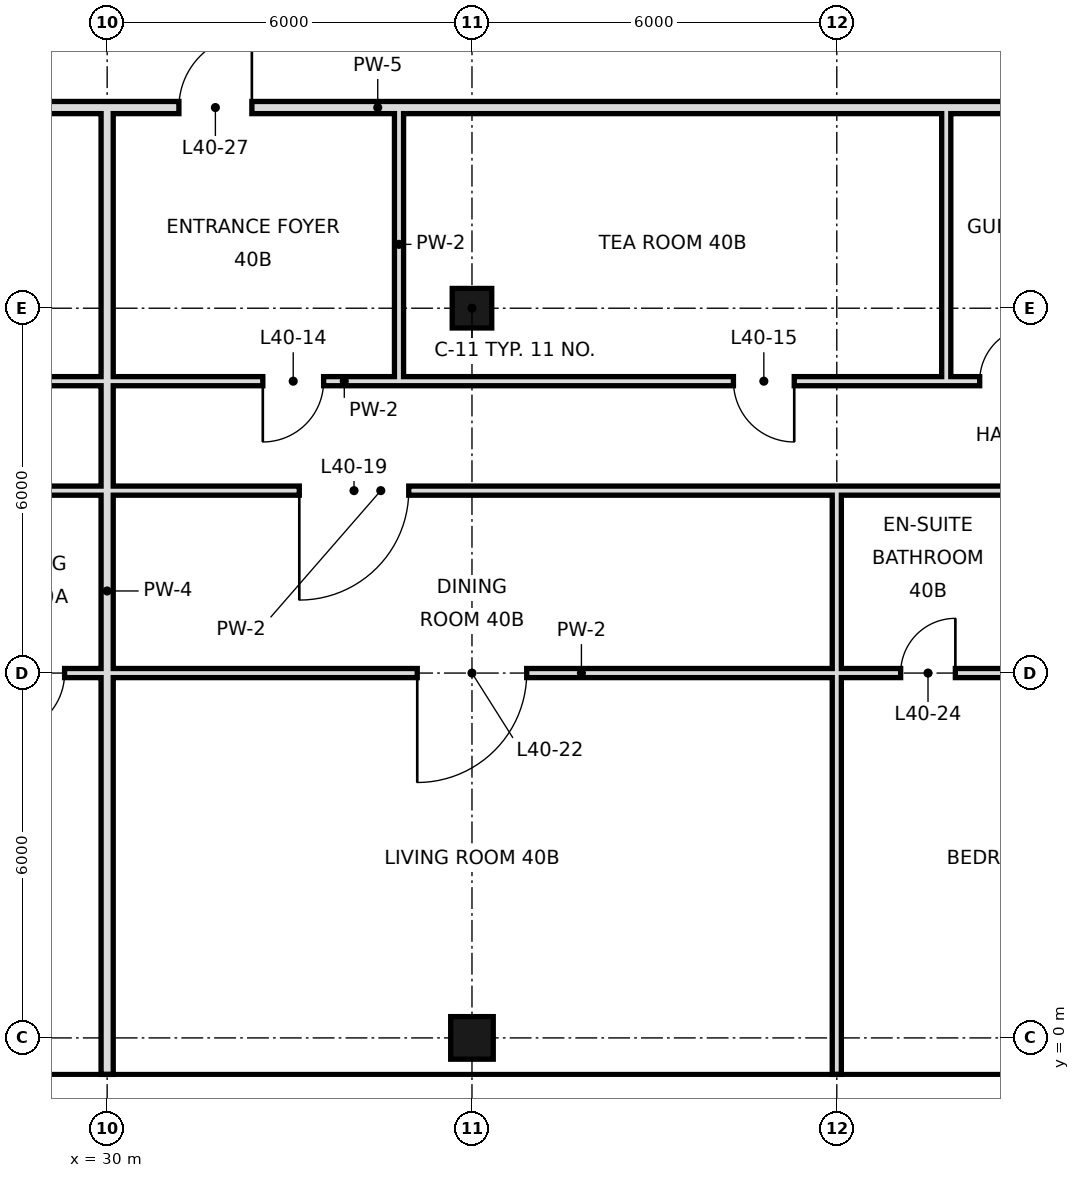
"""IFC4 building model, lengths in metres.
Left out: names, types, materials, properties, quantities, classifications, styles, units other than length and angle.
Written with IfcOpenShell. Run it as: python <this file> out.ifc"""

import sys

from ifc_helpers import new_model, si_unit, direction, frame, frame_2d, origin, origin_2d, place, context, subcontext, project, spatial, rectangle, hollow_rectangle, extrude, element, fill, save


model = new_model("IFC4")
c1 = context("Model", 3, precision=1e-05, world=origin(), true_north=direction((0.0, 1.0)))
c2 = subcontext(c1, "Body", "Model", "MODEL_VIEW")
j1 = project(units=[si_unit("LENGTHUNIT", "METRE"), si_unit("PLANEANGLEUNIT", "RADIAN")], contexts=[c1])
p1 = place(None, origin())
s1 = spatial("IfcSite", under=j1, at=p1, CompositionType="ELEMENT")
p2 = place(p1, origin())
s2 = spatial("IfcBuilding", under=s1, at=p2, CompositionType="ELEMENT")
p3 = place(p2, frame((0.0, 0.0, 174.4)))
s3 = spatial("IfcBuildingStorey", under=s2, at=p3, CompositionType="ELEMENT", Elevation=174.4)
p4 = place(p3, frame((36.0, 0.0, 0.0), z_axis=(0.0, 0.0, 1.0), x_axis=(1.0, 0.0, 0.0)))
e1 = element("IfcColumn", 1, at=p4, inside=s3, PredefinedType="COLUMN", context=c2, shape_type="SweptSolid", body=[
    extrude(hollow_rectangle(XDim=0.7, YDim=0.7, WallThickness=0.036, at=origin_2d()), origin(), (0.0, 0.0, 1.0), 3.6),
])
p5 = place(p3, frame((36.0, 12.0, 0.0), z_axis=(0.0, 0.0, 1.0), x_axis=(1.0, 0.0, 0.0)))
e2 = element("IfcColumn", 2, at=p5, inside=s3, PredefinedType="COLUMN", context=c2, shape_type="SweptSolid", body=[
    extrude(hollow_rectangle(XDim=0.65, YDim=0.65, WallThickness=0.032, at=origin_2d()), origin(), (0.0, 0.0, 1.0), 3.6),
])
p6 = place(p3, frame((30.0, -0.6, 0.0), z_axis=(0.0, 0.0, 1.0), x_axis=(0.0, 1.0, 0.0)))
e3 = element("IfcWall", 3, at=p6, inside=s3, PredefinedType="SOLIDWALL", context=c2, shape_type="SweptSolid", body=[
    extrude(rectangle(XDim=15.9, YDim=0.2, at=frame_2d((7.95, 0.0))), origin(), (0.0, 0.0, 1.0), 2.72),
])
p7 = place(p3, frame((34.8, 10.8, 0.0), z_axis=(0.0, 0.0, 1.0), x_axis=(0.0, 1.0, 0.0)))
e4 = element("IfcWall", 4, at=p7, inside=s3, PredefinedType="PARTITIONING", context=c2, shape_type="SweptSolid", body=[
    extrude(rectangle(XDim=4.5, YDim=0.15, at=frame_2d((2.25, 0.0))), origin(), (0.0, 0.0, 1.0), 3.42),
])
p8 = place(p3, frame((42.0, -0.6, 0.0), z_axis=(0.0, 0.0, 1.0), x_axis=(0.0, 1.0, 0.0)))
e5 = element("IfcWall", 5, at=p8, inside=s3, PredefinedType="PARTITIONING", context=c2, shape_type="SweptSolid", body=[
    extrude(rectangle(XDim=6.6, YDim=0.15, at=frame_2d((3.3, 0.0))), origin(), (0.0, 0.0, 1.0), 2.72),
])
p9 = place(p3, frame((42.0, 6.0, 0.0), z_axis=(0.0, 0.0, 1.0), x_axis=(0.0, 1.0, 0.0)))
e6 = element("IfcWall", 6, at=p9, inside=s3, PredefinedType="PARTITIONING", context=c2, shape_type="SweptSolid", body=[
    extrude(rectangle(XDim=3.0, YDim=0.15, at=frame_2d((1.5, 0.0))), origin(), (0.0, 0.0, 1.0), 2.72),
])
p10 = place(p3, frame((43.8, 10.8, 0.0), z_axis=(0.0, 0.0, 1.0), x_axis=(0.0, 1.0, 0.0)))
e7 = element("IfcWall", 7, at=p10, inside=s3, PredefinedType="PARTITIONING", context=c2, shape_type="SweptSolid", body=[
    extrude(rectangle(XDim=4.5, YDim=0.15, at=frame_2d((2.25, 0.0))), origin(), (0.0, 0.0, 1.0), 3.42),
])
p11 = place(p3, frame((24.0, 10.8, 0.0), z_axis=(0.0, 0.0, 1.0), x_axis=(1.0, 0.0, 0.0)))
e8 = element("IfcWall", 8, at=p11, inside=s3, PredefinedType="PARTITIONING", context=c2, shape_type="SweptSolid", body=[
    extrude(rectangle(XDim=19.8, YDim=0.15, at=frame_2d((9.9, 0.0))), origin(), (0.0, 0.0, 1.0), 3.42),
])
p12 = place(p11, frame((2.5, 0.0, 0.0)))
e9 = element("IfcOpeningElement", 9, at=p12, cuts=e8, PredefinedType="OPENING", context=c2, shape_type="SweptSolid", body=[
    extrude(rectangle(XDim=1.0, YDim=2.4, at=frame_2d((0.5, 1.2))), frame((0.0, 0.085, 0.0), z_axis=(0.0, -1.0, 0.0), x_axis=(1.0, 0.0, 0.0)), (0.0, 0.0, 1.0), 0.17),
])
p13 = place(p11, frame((8.56, 0.0, 0.0)))
e10 = element("IfcOpeningElement", 10, at=p13, cuts=e8, PredefinedType="OPENING", context=c2, shape_type="SweptSolid", body=[
    extrude(rectangle(XDim=1.0, YDim=2.4, at=frame_2d((0.5, 1.2))), frame((0.0, 0.085, 0.0), z_axis=(0.0, -1.0, 0.0), x_axis=(1.0, 0.0, 0.0)), (0.0, 0.0, 1.0), 0.17),
])
p14 = place(p11, frame((16.3, 0.0, 0.0)))
e11 = element("IfcOpeningElement", 11, at=p14, cuts=e8, PredefinedType="OPENING", context=c2, shape_type="SweptSolid", body=[
    extrude(rectangle(XDim=1.0, YDim=2.4, at=frame_2d((0.5, 1.2))), frame((0.0, 0.085, 0.0), z_axis=(0.0, -1.0, 0.0), x_axis=(1.0, 0.0, 0.0)), (0.0, 0.0, 1.0), 0.17),
])
p15 = place(p3, frame((43.8, 10.8, 0.0), z_axis=(0.0, 0.0, 1.0), x_axis=(1.0, 0.0, 0.0)))
e12 = element("IfcWall", 12, at=p15, inside=s3, PredefinedType="PARTITIONING", context=c2, shape_type="SweptSolid", body=[
    extrude(rectangle(XDim=2.4, YDim=0.15, at=frame_2d((1.2, 0.0))), origin(), (0.0, 0.0, 1.0), 3.42),
])
p16 = place(p15, frame((0.55, 0.0, 0.0)))
e13 = element("IfcOpeningElement", 13, at=p16, cuts=e12, PredefinedType="OPENING", context=c2, shape_type="SweptSolid", body=[
    extrude(rectangle(XDim=0.9, YDim=2.4, at=frame_2d((0.45, 1.2))), frame((0.0, 0.085, 0.0), z_axis=(0.0, -1.0, 0.0), x_axis=(1.0, 0.0, 0.0)), (0.0, 0.0, 1.0), 0.17),
])
p17 = place(p3, frame((24.0, 15.3, 0.0), z_axis=(0.0, 0.0, 1.0), x_axis=(1.0, 0.0, 0.0)))
e14 = element("IfcWall", 14, at=p17, inside=s3, PredefinedType="SOLIDWALL", context=c2, shape_type="SweptSolid", body=[
    extrude(rectangle(XDim=20.9, YDim=0.2, at=frame_2d((10.45, 0.0))), origin(), (0.0, 0.0, 1.0), 2.72),
])
p18 = place(p17, frame((3.26, 0.0, 0.0)))
e15 = element("IfcOpeningElement", 15, at=p18, cuts=e14, PredefinedType="OPENING", context=c2, shape_type="SweptSolid", body=[
    extrude(rectangle(XDim=1.2, YDim=2.4, at=frame_2d((0.6, 1.2))), frame((0.0, 0.11, 0.0), z_axis=(0.0, -1.0, 0.0), x_axis=(1.0, 0.0, 0.0)), (0.0, 0.0, 1.0), 0.22),
])
p19 = place(p17, frame((7.18, 0.0, 0.0)))
e16 = element("IfcOpeningElement", 16, at=p19, cuts=e14, PredefinedType="OPENING", context=c2, shape_type="SweptSolid", body=[
    extrude(rectangle(XDim=1.2, YDim=2.4, at=frame_2d((0.6, 1.2))), frame((0.0, 0.11, 0.0), z_axis=(0.0, -1.0, 0.0), x_axis=(1.0, 0.0, 0.0)), (0.0, 0.0, 1.0), 0.22),
])
p20 = place(p3, frame((27.0, 6.0, 0.0), z_axis=(0.0, 0.0, 1.0), x_axis=(1.0, 0.0, 0.0)))
e17 = element("IfcWall", 17, at=p20, inside=s3, PredefinedType="PARTITIONING", context=c2, shape_type="SweptSolid", body=[
    extrude(rectangle(XDim=15.0, YDim=0.15, at=frame_2d((7.5, 0.0))), origin(), (0.0, 0.0, 1.0), 2.97),
])
p21 = place(p20, frame((1.3, 0.0, 0.0)))
e18 = element("IfcOpeningElement", 18, at=p21, cuts=e17, PredefinedType="OPENING", context=c2, shape_type="SweptSolid", body=[
    extrude(rectangle(XDim=1.0, YDim=2.4, at=frame_2d((0.5, 1.2))), frame((0.0, 0.085, 0.0), z_axis=(0.0, -1.0, 0.0), x_axis=(1.0, 0.0, 0.0)), (0.0, 0.0, 1.0), 0.17),
])
p22 = place(p20, frame((8.1, 0.0, 0.0)))
e19 = element("IfcOpeningElement", 19, at=p22, cuts=e17, PredefinedType="OPENING", context=c2, shape_type="SweptSolid", body=[
    extrude(rectangle(XDim=1.8, YDim=2.4, at=frame_2d((0.9, 1.2))), frame((0.0, 0.085, 0.0), z_axis=(0.0, -1.0, 0.0), x_axis=(1.0, 0.0, 0.0)), (0.0, 0.0, 1.0), 0.17),
])
p23 = place(p3, frame((42.0, 6.0, 0.0), z_axis=(0.0, 0.0, 1.0), x_axis=(1.0, 0.0, 0.0)))
e20 = element("IfcWall", 20, at=p23, inside=s3, PredefinedType="PARTITIONING", context=c2, shape_type="SweptSolid", body=[
    extrude(rectangle(XDim=3.0, YDim=0.15, at=frame_2d((1.5, 0.0))), origin(), (0.0, 0.0, 1.0), 2.97),
])
p24 = place(p23, frame((1.05, 0.0, 0.0)))
e21 = element("IfcOpeningElement", 21, at=p24, cuts=e20, PredefinedType="OPENING", context=c2, shape_type="SweptSolid", body=[
    extrude(rectangle(XDim=0.9, YDim=2.4, at=frame_2d((0.45, 1.2))), frame((0.0, 0.085, 0.0), z_axis=(0.0, -1.0, 0.0), x_axis=(1.0, 0.0, 0.0)), (0.0, 0.0, 1.0), 0.17),
])
p25 = place(p3, frame((27.0, 9.0, 0.0), z_axis=(0.0, 0.0, 1.0), x_axis=(1.0, 0.0, 0.0)))
e22 = element("IfcWall", 22, at=p25, inside=s3, PredefinedType="PARTITIONING", context=c2, shape_type="SweptSolid", body=[
    extrude(rectangle(XDim=15.0, YDim=0.15, at=frame_2d((7.5, 0.0))), origin(), (0.0, 0.0, 1.0), 3.42),
])
p26 = place(p25, frame((1.0, 0.0, 0.0)))
e23 = element("IfcOpeningElement", 23, at=p26, cuts=e22, PredefinedType="OPENING", context=c2, shape_type="SweptSolid", body=[
    extrude(rectangle(XDim=1.0, YDim=2.4, at=frame_2d((0.5, 1.2))), frame((0.0, 0.085, 0.0), z_axis=(0.0, -1.0, 0.0), x_axis=(1.0, 0.0, 0.0)), (0.0, 0.0, 1.0), 0.17),
])
p27 = place(p25, frame((6.16, 0.0, 0.0)))
e24 = element("IfcOpeningElement", 24, at=p27, cuts=e22, PredefinedType="OPENING", context=c2, shape_type="SweptSolid", body=[
    extrude(rectangle(XDim=1.8, YDim=2.4, at=frame_2d((0.9, 1.2))), frame((0.0, 0.085, 0.0), z_axis=(0.0, -1.0, 0.0), x_axis=(1.0, 0.0, 0.0)), (0.0, 0.0, 1.0), 0.17),
])
p28 = place(p3, frame((42.0, 9.0, 0.0), z_axis=(0.0, 0.0, 1.0), x_axis=(1.0, 0.0, 0.0)))
e25 = element("IfcWall", 25, at=p28, inside=s3, PredefinedType="PARTITIONING", context=c2, shape_type="SweptSolid", body=[
    extrude(rectangle(XDim=3.0, YDim=0.15, at=frame_2d((1.5, 0.0))), origin(), (0.0, 0.0, 1.0), 3.42),
])
p29 = place(p21, frame((1.0, 0.0, 0.0), z_axis=(0.0, 0.0, 1.0), x_axis=(-1.0, 0.0, 0.0)))
e26 = element("IfcDoor", 26, at=p29, inside=s3, OperationType="SINGLE_SWING_RIGHT", PredefinedType="DOOR", context=c2, shape_type="SweptSolid", body=[
    extrude(rectangle(XDim=1.0, YDim=2.4, at=frame_2d((0.5, 1.2))), frame((0.0, 0.025, 0.0), z_axis=(0.0, -1.0, 0.0), x_axis=(1.0, 0.0, 0.0)), (0.0, 0.0, 1.0), 0.05),
])
fill(e18, e26)
p30 = place(p13, frame((1.0, 0.0, 0.0), z_axis=(0.0, 0.0, 1.0), x_axis=(-1.0, 0.0, 0.0)))
e27 = element("IfcDoor", 27, at=p30, inside=s3, OperationType="SINGLE_SWING_RIGHT", PredefinedType="DOOR", context=c2, shape_type="SweptSolid", body=[
    extrude(rectangle(XDim=1.0, YDim=2.4, at=frame_2d((0.5, 1.2))), frame((0.0, 0.025, 0.0), z_axis=(0.0, -1.0, 0.0), x_axis=(1.0, 0.0, 0.0)), (0.0, 0.0, 1.0), 0.05),
])
fill(e10, e27)
p31 = place(p14, origin())
e28 = element("IfcDoor", 28, at=p31, inside=s3, OperationType="SINGLE_SWING_RIGHT", PredefinedType="DOOR", context=c2, shape_type="SweptSolid", body=[
    extrude(rectangle(XDim=1.0, YDim=2.4, at=frame_2d((0.5, 1.2))), frame((0.0, 0.025, 0.0), z_axis=(0.0, -1.0, 0.0), x_axis=(1.0, 0.0, 0.0)), (0.0, 0.0, 1.0), 0.05),
])
fill(e11, e28)
p32 = place(p16, frame((0.9, 0.0, 0.0), z_axis=(0.0, 0.0, 1.0), x_axis=(-1.0, 0.0, 0.0)))
e29 = element("IfcDoor", 29, at=p32, inside=s3, OperationType="SINGLE_SWING_LEFT", PredefinedType="DOOR", context=c2, shape_type="SweptSolid", body=[
    extrude(rectangle(XDim=0.9, YDim=2.4, at=frame_2d((0.45, 1.2))), frame((0.0, 0.025, 0.0), z_axis=(0.0, -1.0, 0.0), x_axis=(1.0, 0.0, 0.0)), (0.0, 0.0, 1.0), 0.05),
])
fill(e13, e29)
p33 = place(p27, frame((1.8, 0.0, 0.0), z_axis=(0.0, 0.0, 1.0), x_axis=(-1.0, 0.0, 0.0)))
e30 = element("IfcDoor", 30, at=p33, inside=s3, OperationType="SINGLE_SWING_RIGHT", PredefinedType="DOOR", context=c2, shape_type="SweptSolid", body=[
    extrude(rectangle(XDim=1.8, YDim=2.4, at=frame_2d((0.9, 1.2))), frame((0.0, 0.025, 0.0), z_axis=(0.0, -1.0, 0.0), x_axis=(1.0, 0.0, 0.0)), (0.0, 0.0, 1.0), 0.05),
])
fill(e24, e30)
p34 = place(p22, frame((1.8, 0.0, 0.0), z_axis=(0.0, 0.0, 1.0), x_axis=(-1.0, 0.0, 0.0)))
e31 = element("IfcDoor", 31, at=p34, inside=s3, OperationType="SINGLE_SWING_RIGHT", PredefinedType="DOOR", context=c2, shape_type="SweptSolid", body=[
    extrude(rectangle(XDim=1.8, YDim=2.4, at=frame_2d((0.9, 1.2))), frame((0.0, 0.025, 0.0), z_axis=(0.0, -1.0, 0.0), x_axis=(1.0, 0.0, 0.0)), (0.0, 0.0, 1.0), 0.05),
])
fill(e19, e31)
p35 = place(p24, frame((0.9, 0.0, 0.0), z_axis=(0.0, 0.0, 1.0), x_axis=(-1.0, 0.0, 0.0)))
e32 = element("IfcDoor", 32, at=p35, inside=s3, OperationType="SINGLE_SWING_LEFT", PredefinedType="DOOR", context=c2, shape_type="SweptSolid", body=[
    extrude(rectangle(XDim=0.9, YDim=2.4, at=frame_2d((0.45, 1.2))), frame((0.0, 0.025, 0.0), z_axis=(0.0, -1.0, 0.0), x_axis=(1.0, 0.0, 0.0)), (0.0, 0.0, 1.0), 0.05),
])
fill(e21, e32)
p36 = place(p19, frame((1.2, 0.0, 0.0), z_axis=(0.0, 0.0, 1.0), x_axis=(-1.0, 0.0, 0.0)))
e33 = element("IfcDoor", 33, at=p36, inside=s3, OperationType="SINGLE_SWING_LEFT", PredefinedType="DOOR", context=c2, shape_type="SweptSolid", body=[
    extrude(rectangle(XDim=1.2, YDim=2.4, at=frame_2d((0.6, 1.2))), frame((0.0, 0.025, 0.0), z_axis=(0.0, -1.0, 0.0), x_axis=(1.0, 0.0, 0.0)), (0.0, 0.0, 1.0), 0.05),
])
fill(e16, e33)
save(model, sys.argv[1])
